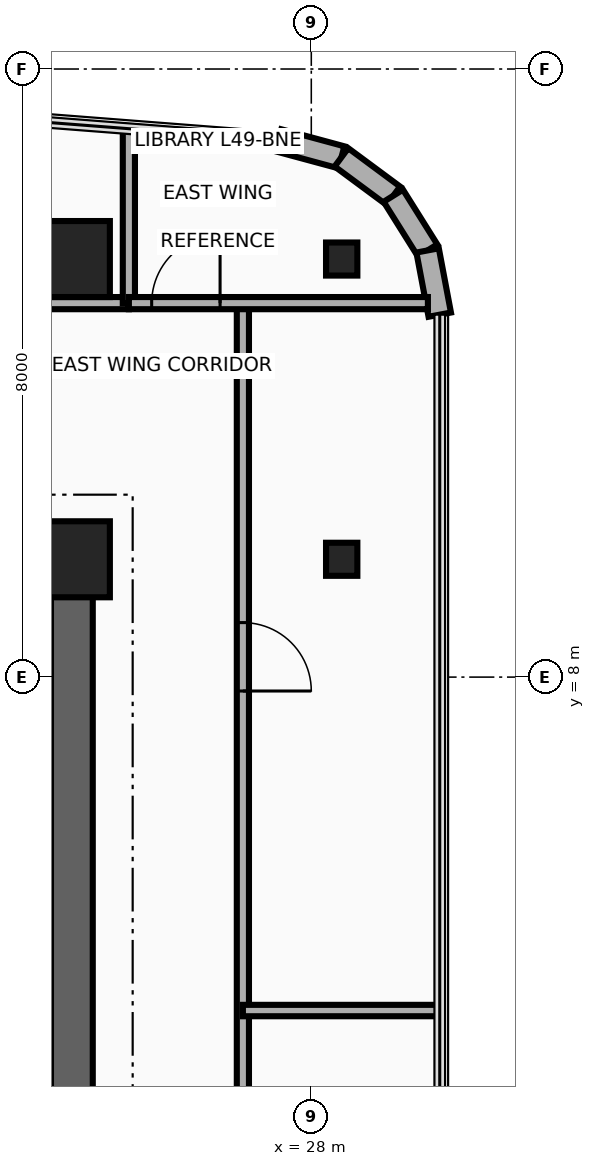
"""IFC4 building model, lengths in metres.
Left out: names, types, materials, properties, quantities, classifications, styles, units other than length and angle.
Written with IfcOpenShell. Run it as: python <this file> out.ifc"""

import sys

from ifc_helpers import new_model, si_unit, direction, frame, frame_2d, origin, origin_2d, place, context, subcontext, project, spatial, rectangle, i_section, extrude, source, transform, mapped, element, fill, save


model = new_model("IFC4")
c1 = context("Model", 3, precision=1e-05, world=origin(), true_north=direction((0.0, 1.0)))
c2 = subcontext(c1, "Body", "Model", "MODEL_VIEW")
j1 = project(units=[si_unit("LENGTHUNIT", "METRE"), si_unit("PLANEANGLEUNIT", "RADIAN")], contexts=[c1])
p1 = place(None, origin())
s1 = spatial("IfcSite", under=j1, at=p1, CompositionType="ELEMENT")
p2 = place(p1, origin())
s2 = spatial("IfcBuilding", under=s1, at=p2, CompositionType="ELEMENT")
p3 = place(p2, frame((0.0, 0.0, 192.35)))
s3 = spatial("IfcBuildingStorey", under=s2, at=p3, CompositionType="ELEMENT", Elevation=192.35)
p4 = place(p3, frame((24.85, 0.95, 0.0), z_axis=(0.0, 0.0, 1.0), x_axis=(0.0, 1.0, 0.0)))
e1 = element("IfcWall", 1, at=p4, inside=s3, PredefinedType="SHEAR", context=c2, shape_type="SweptSolid", body=[
    extrude(rectangle(XDim=8.875, YDim=0.55, at=frame_2d((4.438, 0.0))), origin(), (0.0, 0.0, 1.0), 3.71),
])
p5 = place(p3, frame((15.85, 9.55, 0.0), z_axis=(0.0, 0.0, 1.0), x_axis=(1.0, 0.0, 0.0)))
e2 = element("IfcWall", 2, at=p5, inside=s3, PredefinedType="SHEAR", context=c2, shape_type="SweptSolid", body=[
    extrude(rectangle(XDim=9.0, YDim=0.55, at=frame_2d((4.5, 0.0))), origin(), (0.0, 0.0, 1.0), 3.71),
])
m1 = source(origin(), c2, "Body", "SweptSolid", [
    extrude(rectangle(XDim=1.0, YDim=1.0, at=origin_2d()), origin(), (0.0, 0.0, 1.0), 3.95),
])
p6 = place(p3, frame((24.85, 9.55, 0.0), z_axis=(0.0, 0.0, 1.0), x_axis=(1.0, 0.0, 0.0)))
e3 = element("IfcColumn", 3, at=p6, inside=s3, PredefinedType="COLUMN", context=c2, shape_type="MappedRepresentation", body=[
    mapped(m1, transform((0.0, 0.0, 0.0), x_axis=(1.0, 0.0, 0.0), y_axis=(0.0, 1.0, 0.0), z_axis=(0.0, 0.0, 1.0), scale=1.0)),
])
m2 = source(origin(), c2, "Body", "SweptSolid", [
    extrude(i_section(OverallWidth=0.412, OverallDepth=0.435, WebThickness=0.036, FlangeThickness=0.057, at=origin_2d()), origin(), (0.0, 0.0, 1.0), 3.95),
])
p7 = place(p3, frame((28.4, 9.55, 0.0), z_axis=(0.0, 0.0, 1.0), x_axis=(1.0, 0.0, 0.0)))
e4 = element("IfcColumn", 4, at=p7, inside=s3, PredefinedType="COLUMN", context=c2, shape_type="MappedRepresentation", body=[
    mapped(m2, transform((0.0, 0.0, 0.0), x_axis=(1.0, 0.0, 0.0), y_axis=(0.0, 1.0, 0.0), z_axis=(0.0, 0.0, 1.0), scale=1.0)),
])
p8 = place(p3, frame((24.85, 13.5, 0.0), z_axis=(0.0, 0.0, 1.0), x_axis=(1.0, 0.0, 0.0)))
e5 = element("IfcColumn", 5, at=p8, inside=s3, PredefinedType="COLUMN", context=c2, shape_type="MappedRepresentation", body=[
    mapped(m1, transform((0.0, 0.0, 0.0), x_axis=(1.0, 0.0, 0.0), y_axis=(0.0, 1.0, 0.0), z_axis=(0.0, 0.0, 1.0), scale=1.0)),
])
p9 = place(p3, frame((28.4, 13.5, 0.0), z_axis=(0.0, 0.0, 1.0), x_axis=(1.0, 0.0, 0.0)))
e6 = element("IfcColumn", 6, at=p9, inside=s3, PredefinedType="COLUMN", context=c2, shape_type="MappedRepresentation", body=[
    mapped(m2, transform((0.0, 0.0, 0.0), x_axis=(1.0, 0.0, 0.0), y_axis=(0.0, 1.0, 0.0), z_axis=(0.0, 0.0, 1.0), scale=1.0)),
])
p10 = place(p3, frame((27.566, 15.062, 0.0), z_axis=(0.0, 0.0, 1.0), x_axis=(0.965357594382, -0.260930479187, 0.0)))
e7 = element("IfcWall", 7, at=p10, inside=s3, PredefinedType="SOLIDWALL", context=c2, shape_type="SweptSolid", body=[
    extrude(rectangle(XDim=0.86, YDim=0.3, at=frame_2d((0.43, 0.0))), origin(), (0.0, 0.0, 1.0), 3.71),
])
p11 = place(p3, frame((28.396, 14.838, 0.0), z_axis=(0.0, 0.0, 1.0), x_axis=(0.803847397988, -0.594835574548, 0.0)))
e8 = element("IfcWall", 8, at=p11, inside=s3, PredefinedType="SOLIDWALL", context=c2, shape_type="SweptSolid", body=[
    extrude(rectangle(XDim=0.849, YDim=0.3, at=frame_2d((0.425, 0.0))), origin(), (0.0, 0.0, 1.0), 3.71),
])
p12 = place(p3, frame((29.079, 14.333, 0.0), z_axis=(0.0, 0.0, 1.0), x_axis=(0.53134147342, -0.847157741288, 0.0)))
e9 = element("IfcWall", 9, at=p12, inside=s3, PredefinedType="SOLIDWALL", context=c2, shape_type="SweptSolid", body=[
    extrude(rectangle(XDim=0.85, YDim=0.3, at=frame_2d((0.425, 0.0))), origin(), (0.0, 0.0, 1.0), 3.71),
])
p13 = place(p3, frame((29.531, 13.613, 0.0), z_axis=(0.0, 0.0, 1.0), x_axis=(0.185402686284, -0.982662629756, 0.0)))
e10 = element("IfcWall", 10, at=p13, inside=s3, PredefinedType="SOLIDWALL", context=c2, shape_type="SweptSolid", body=[
    extrude(rectangle(XDim=0.86, YDim=0.3, at=frame_2d((0.43, 0.0))), origin(), (0.0, 0.0, 1.0), 3.71),
])
p14 = place(p3, frame((15.4, 12.92, 0.0), z_axis=(0.0, 0.0, 1.0), x_axis=(1.0, 0.0, 0.0)))
e11 = element("IfcWall", 11, at=p14, inside=s3, PredefinedType="PARTITIONING", context=c2, shape_type="SweptSolid", body=[
    extrude(rectangle(XDim=10.2, YDim=0.16, at=frame_2d((5.1, 0.0))), origin(), (0.0, 0.0, 1.0), 3.084),
])
p15 = place(p14, frame((4.65, 0.0, 0.0)))
e12 = element("IfcOpeningElement", 12, at=p15, cuts=e11, PredefinedType="OPENING", context=c2, shape_type="SweptSolid", body=[
    extrude(rectangle(XDim=0.9, YDim=2.1, at=frame_2d((0.45, 1.05))), frame((0.0, 0.095, 0.0), z_axis=(0.0, -1.0, 0.0), x_axis=(1.0, 0.0, 0.0)), (0.0, 0.0, 1.0), 0.19),
])
p16 = place(p3, frame((25.6, 12.92, 0.0), z_axis=(0.0, 0.0, 1.0), x_axis=(0.0, 1.0, 0.0)))
e13 = element("IfcWall", 13, at=p16, inside=s3, PredefinedType="PARTITIONING", context=c2, shape_type="SweptSolid", body=[
    extrude(rectangle(XDim=2.295, YDim=0.16, at=frame_2d((1.147, 0.0))), origin(), (0.0, 0.0, 1.0), 2.994),
])
p17 = place(p3, frame((27.1, -11.89, 0.0), z_axis=(0.0, 0.0, 1.0), x_axis=(0.0, 1.0, 0.0)))
e14 = element("IfcWall", 14, at=p17, inside=s3, PredefinedType="PARTITIONING", context=c2, shape_type="SweptSolid", body=[
    extrude(rectangle(XDim=24.81, YDim=0.16, at=frame_2d((12.405, 0.0))), origin(), (0.0, 0.0, 1.0), 2.994),
])
p18 = place(p17, frame((2.648, 0.0, 0.0)))
e15 = element("IfcOpeningElement", 15, at=p18, cuts=e14, PredefinedType="OPENING", context=c2, shape_type="SweptSolid", body=[
    extrude(rectangle(XDim=0.9, YDim=2.1, at=frame_2d((0.45, 1.05))), frame((0.0, 0.095, 0.0), z_axis=(0.0, -1.0, 0.0), x_axis=(1.0, 0.0, 0.0)), (0.0, 0.0, 1.0), 0.19),
])
p19 = place(p17, frame((10.4, 0.0, 0.0)))
e16 = element("IfcOpeningElement", 16, at=p19, cuts=e14, PredefinedType="OPENING", context=c2, shape_type="SweptSolid", body=[
    extrude(rectangle(XDim=0.9, YDim=2.1, at=frame_2d((0.45, 1.05))), frame((0.0, 0.095, 0.0), z_axis=(0.0, -1.0, 0.0), x_axis=(1.0, 0.0, 0.0)), (0.0, 0.0, 1.0), 0.19),
])
p20 = place(p17, frame((19.707, 0.0, 0.0)))
e17 = element("IfcOpeningElement", 17, at=p20, cuts=e14, PredefinedType="OPENING", context=c2, shape_type="SweptSolid", body=[
    extrude(rectangle(XDim=0.9, YDim=2.1, at=frame_2d((0.45, 1.05))), frame((0.0, 0.095, 0.0), z_axis=(0.0, -1.0, 0.0), x_axis=(1.0, 0.0, 0.0)), (0.0, 0.0, 1.0), 0.19),
])
p21 = place(p3, frame((25.6, 12.92, 0.0), z_axis=(0.0, 0.0, 1.0), x_axis=(1.0, 0.0, 0.0)))
e18 = element("IfcWall", 18, at=p21, inside=s3, PredefinedType="PARTITIONING", context=c2, shape_type="SweptSolid", body=[
    extrude(rectangle(XDim=3.934, YDim=0.16, at=frame_2d((1.967, 0.0))), origin(), (0.0, 0.0, 1.0), 3.156),
])
p22 = place(p21, frame((0.3, 0.0, 0.0)))
e19 = element("IfcOpeningElement", 19, at=p22, cuts=e18, PredefinedType="OPENING", context=c2, shape_type="SweptSolid", body=[
    extrude(rectangle(XDim=0.9, YDim=2.1, at=frame_2d((0.45, 1.05))), frame((0.0, 0.095, 0.0), z_axis=(0.0, -1.0, 0.0), x_axis=(1.0, 0.0, 0.0)), (0.0, 0.0, 1.0), 0.19),
])
p23 = place(p3, frame((27.1, 3.613, 0.0), z_axis=(0.0, 0.0, 1.0), x_axis=(1.0, 0.0, 0.0)))
e20 = element("IfcWall", 20, at=p23, inside=s3, PredefinedType="PARTITIONING", context=c2, shape_type="SweptSolid", body=[
    extrude(rectangle(XDim=2.59, YDim=0.15, at=frame_2d((1.295, 0.0))), origin(), (0.0, 0.0, 1.0), 3.156),
])
p24 = place(p22, origin())
e21 = element("IfcDoor", 21, at=p24, inside=s3, OperationType="SINGLE_SWING_RIGHT", PredefinedType="DOOR", context=c2, shape_type="SweptSolid", body=[
    extrude(rectangle(XDim=0.9, YDim=2.1, at=frame_2d((0.45, 1.05))), frame((0.0, 0.025, 0.0), z_axis=(0.0, -1.0, 0.0), x_axis=(1.0, 0.0, 0.0)), (0.0, 0.0, 1.0), 0.05),
])
fill(e19, e21)
p25 = place(p20, frame((0.9, 0.0, 0.0), z_axis=(0.0, 0.0, 1.0), x_axis=(-1.0, 0.0, 0.0)))
e22 = element("IfcDoor", 22, at=p25, inside=s3, OperationType="SINGLE_SWING_LEFT", PredefinedType="DOOR", context=c2, shape_type="SweptSolid", body=[
    extrude(rectangle(XDim=0.9, YDim=2.1, at=frame_2d((0.45, 1.05))), frame((0.0, 0.025, 0.0), z_axis=(0.0, -1.0, 0.0), x_axis=(1.0, 0.0, 0.0)), (0.0, 0.0, 1.0), 0.05),
])
fill(e17, e22)
save(model, sys.argv[1])
